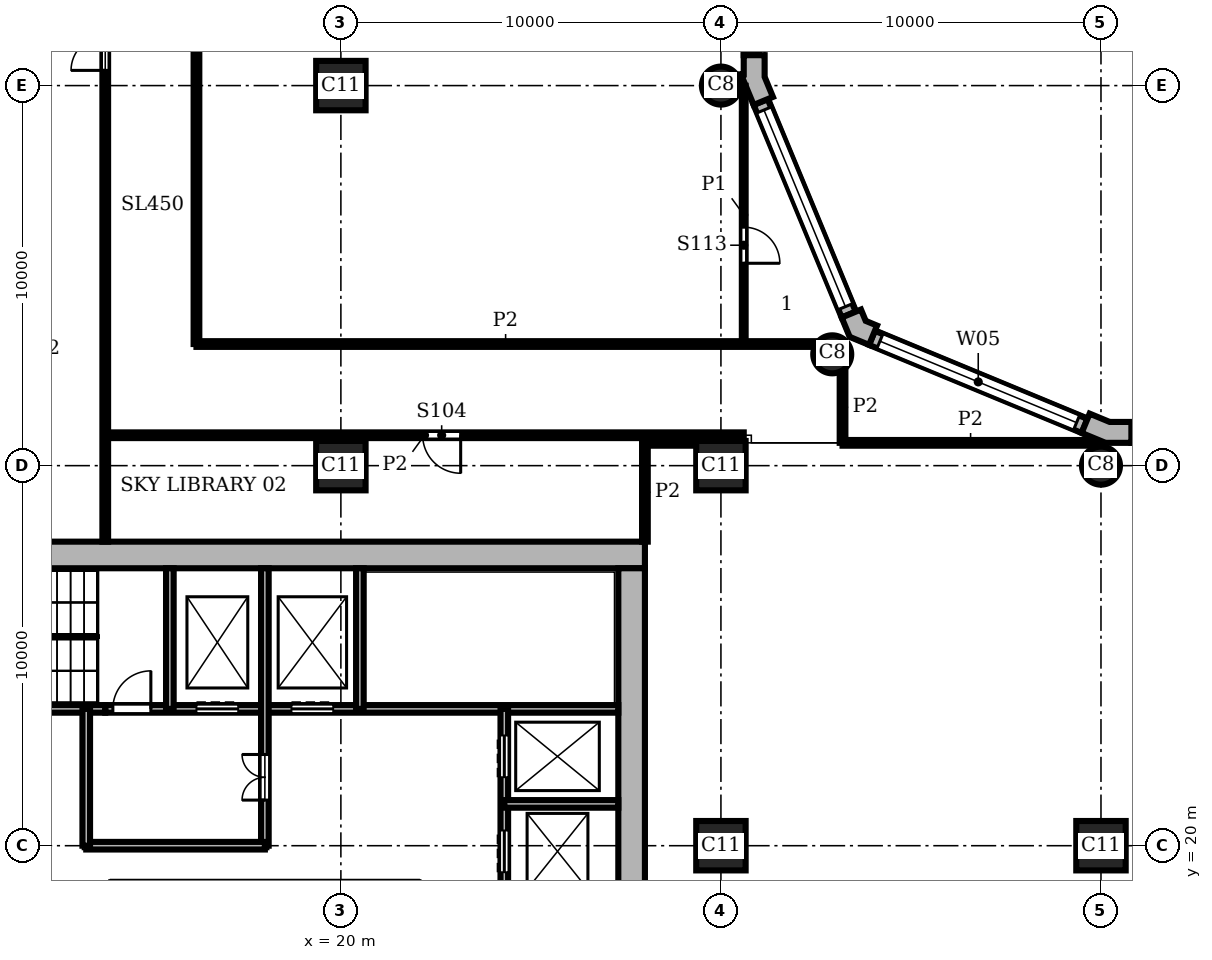
"""IFC4 building model, lengths in metres.
Left out: names, types, materials, properties, quantities, classifications, styles, units other than length and angle.
Written with IfcOpenShell. Run it as: python <this file> out.ifc"""

import sys

from ifc_helpers import new_model, si_unit, direction, frame, frame_2d, origin, origin_2d, place, context, subcontext, project, spatial, polyline, rectangle, circle, outline, extrude, element, fill, save


model = new_model("IFC4")
c1 = context("Model", 3, precision=1e-05, world=origin(), true_north=direction((0.0, 1.0)))
c2 = subcontext(c1, "Body", "Model", "MODEL_VIEW")
j1 = project(units=[si_unit("LENGTHUNIT", "METRE"), si_unit("PLANEANGLEUNIT", "RADIAN")], contexts=[c1])
p1 = place(None, origin())
s1 = spatial("IfcSite", under=j1, at=p1, CompositionType="ELEMENT")
p2 = place(p1, origin())
s2 = spatial("IfcBuilding", under=s1, at=p2, CompositionType="ELEMENT")
p3 = place(p2, frame((0.0, 0.0, 126.3)))
s3 = spatial("IfcBuildingStorey", under=s2, at=p3, CompositionType="ELEMENT", Elevation=126.3)
for number, where, z_axis, x_axis in (
    (1, (40.0, 30.0, 0.0), (0.0, 0.0, 1.0), (1.0, 0.0, 0.0)),
    (2, (32.929, 32.929, 0.0), (0.0, 0.0, 1.0), (1.0, 0.0, 0.0)),
    (3, (30.0, 40.0, 0.0), (0.0, 0.0, 1.0), (1.0, 0.0, 0.0)),
):
    element("IfcColumn", number, at=place(p3, frame(where, z_axis=z_axis, x_axis=x_axis)), inside=s3, PredefinedType="COLUMN", context=c2, shape_type="SweptSolid", body=[
        extrude(circle(Radius=0.5, at=origin_2d()), origin(), (0.0, 0.0, 1.0), 5.4),
    ])
for number, where, z_axis, x_axis in (
    (4, (20.0, 30.0, 0.0), (0.0, 0.0, 1.0), (1.0, 0.0, 0.0)),
    (5, (20.0, 40.0, 0.0), (0.0, 0.0, 1.0), (1.0, 0.0, 0.0)),
    (6, (30.0, 20.0, 0.0), (0.0, 0.0, 1.0), (1.0, 0.0, 0.0)),
    (7, (30.0, 30.0, 0.0), (0.0, 0.0, 1.0), (1.0, 0.0, 0.0)),
    (8, (40.0, 20.0, 0.0), (0.0, 0.0, 1.0), (1.0, 0.0, 0.0)),
):
    element("IfcColumn", number, at=place(p3, frame(where, z_axis=z_axis, x_axis=x_axis)), inside=s3, PredefinedType="COLUMN", context=c2, shape_type="SweptSolid", body=[
        extrude(rectangle(XDim=1.3, YDim=1.3, at=origin_2d()), origin(), (0.0, 0.0, 1.0), 5.4),
    ])
p4 = place(p3, frame((27.65, 8.7, 0.0), z_axis=(0.0, 0.0, 1.0), x_axis=(0.0, 1.0, 0.0)))
e9 = element("IfcWall", 9, at=p4, inside=s3, PredefinedType="SHEAR", context=c2, shape_type="SweptSolid", body=[
    extrude(rectangle(XDim=18.6, YDim=0.7, at=frame_2d((9.3, 0.0))), origin(), (0.0, 0.0, 1.0), 5.4),
])
p5 = place(p4, frame((4.75, 0.0, 0.0)))
e10 = element("IfcOpeningElement", 10, at=p5, cuts=e9, PredefinedType="OPENING", context=c2, shape_type="SweptSolid", body=[
    extrude(rectangle(XDim=1.6, YDim=2.1, at=frame_2d((0.8, 1.05))), frame((0.0, 0.36, 0.0), z_axis=(0.0, -1.0, 0.0), x_axis=(1.0, 0.0, 0.0)), (0.0, 0.0, 1.0), 0.72),
])
p6 = place(p3, frame((28.0, 27.65, 0.0), z_axis=(0.0, 0.0, 1.0), x_axis=(-1.0, 0.0, 0.0)))
e11 = element("IfcWall", 11, at=p6, inside=s3, PredefinedType="SHEAR", context=c2, shape_type="SweptSolid", body=[
    extrude(rectangle(XDim=20.0, YDim=0.7, at=frame_2d((10.0, 0.0))), origin(), (0.0, 0.0, 1.0), 5.4),
])
p7 = place(p3, origin())
e12 = element("IfcWall", 12, at=p7, inside=s3, PredefinedType="SOLIDWALL", context=c2, shape_type="SweptSolid", body=[
    extrude(outline(polyline([(40.8, 31.0), (40.8, 31.15), (40.229, 31.15), (39.701, 31.369), (39.644, 31.23), (39.49, 30.861), (40.119, 30.6), (40.8, 30.6), (40.8, 31.0)])), origin(), (0.0, 0.0, 1.0), 5.4),
])
e13 = element("IfcWall", 13, at=p7, inside=s3, PredefinedType="SOLIDWALL", context=c2, shape_type="SweptSolid", body=[
    extrude(outline(polyline([(34.051, 33.547), (34.108, 33.685), (33.809, 33.809), (33.685, 34.108), (33.547, 34.051), (33.177, 33.898), (33.388, 33.388), (33.898, 33.177), (34.051, 33.547)])), origin(), (0.0, 0.0, 1.0), 5.4),
])
e14 = element("IfcWall", 14, at=p7, inside=s3, PredefinedType="SOLIDWALL", context=c2, shape_type="SweptSolid", body=[
    extrude(outline(polyline([(30.62, 39.995), (30.62, 40.071), (30.861, 39.49), (31.23, 39.644), (31.369, 39.701), (31.15, 40.229), (31.15, 40.8), (31.0, 40.8), (30.6, 40.8), (30.6, 40.295), (30.5, 40.295), (30.5, 39.995), (30.62, 39.995)])), origin(), (0.0, 0.0, 1.0), 5.4),
])
p8 = place(p3, frame((59.2, 30.8, 0.0), z_axis=(0.0, 0.0, 1.0), x_axis=(-1.0, 0.0, 0.0)))
e15 = element("IfcWall", 15, at=p8, inside=s3, PredefinedType="SOLIDWALL", context=c2, shape_type="SweptSolid", body=[
    extrude(rectangle(XDim=18.4, YDim=0.4, at=frame_2d((9.2, 0.0))), origin(), (0.0, 0.0, 1.0), 5.4),
])
p9 = place(p8, frame((0.2, 0.0, 0.9)))
e16 = element("IfcOpeningElement", 16, at=p9, cuts=e15, PredefinedType="OPENING", context=c2, shape_type="SweptSolid", body=[
    extrude(rectangle(XDim=8.0, YDim=3.4, at=frame_2d((4.0, 1.7))), frame((0.0, 0.21, 0.0), z_axis=(0.0, -1.0, 0.0), x_axis=(1.0, 0.0, 0.0)), (0.0, 0.0, 1.0), 0.42),
])
p10 = place(p8, frame((10.2, 0.0, 0.9)))
e17 = element("IfcOpeningElement", 17, at=p10, cuts=e15, PredefinedType="OPENING", context=c2, shape_type="SweptSolid", body=[
    extrude(rectangle(XDim=8.0, YDim=3.4, at=frame_2d((4.0, 1.7))), frame((0.0, 0.21, 0.0), z_axis=(0.0, -1.0, 0.0), x_axis=(1.0, 0.0, 0.0)), (0.0, 0.0, 1.0), 0.42),
])
p11 = place(p3, frame((39.567, 31.045, 0.0), z_axis=(0.0, 0.0, 1.0), x_axis=(-0.923891000409, 0.382655745237, 0.0)))
e18 = element("IfcWall", 18, at=p11, inside=s3, PredefinedType="SOLIDWALL", context=c2, shape_type="SweptSolid", body=[
    extrude(rectangle(XDim=6.053, YDim=0.4, at=frame_2d((3.027, 0.0))), origin(), (0.0, 0.0, 1.0), 5.4),
])
p12 = place(p11, frame((0.227, 0.0, 0.9)))
e19 = element("IfcOpeningElement", 19, at=p12, cuts=e18, PredefinedType="OPENING", context=c2, shape_type="SweptSolid", body=[
    extrude(rectangle(XDim=5.6, YDim=3.4, at=frame_2d((2.8, 1.7))), frame((0.0, 0.21, 0.0), z_axis=(0.0, -1.0, 0.0), x_axis=(1.0, 0.0, 0.0)), (0.0, 0.0, 1.0), 0.42),
])
p13 = place(p3, frame((33.362, 33.974, 0.0), z_axis=(0.0, 0.0, 1.0), x_axis=(-0.382655745237, 0.923891000409, 0.0)))
e20 = element("IfcWall", 20, at=p13, inside=s3, PredefinedType="SOLIDWALL", context=c2, shape_type="SweptSolid", body=[
    extrude(rectangle(XDim=6.053, YDim=0.4, at=frame_2d((3.027, 0.0))), origin(), (0.0, 0.0, 1.0), 5.4),
])
p14 = place(p13, frame((0.227, 0.0, 0.9)))
e21 = element("IfcOpeningElement", 21, at=p14, cuts=e20, PredefinedType="OPENING", context=c2, shape_type="SweptSolid", body=[
    extrude(rectangle(XDim=5.6, YDim=3.4, at=frame_2d((2.8, 1.7))), frame((0.0, 0.21, 0.0), z_axis=(0.0, -1.0, 0.0), x_axis=(1.0, 0.0, 0.0)), (0.0, 0.0, 1.0), 0.42),
])
p15 = place(p3, frame((30.8, 40.8, 0.0), z_axis=(0.0, 0.0, 1.0), x_axis=(0.0, 1.0, 0.0)))
e22 = element("IfcWall", 22, at=p15, inside=s3, PredefinedType="SOLIDWALL", context=c2, shape_type="SweptSolid", body=[
    extrude(rectangle(XDim=18.4, YDim=0.4, at=frame_2d((9.2, 0.0))), origin(), (0.0, 0.0, 1.0), 5.4),
])
p16 = place(p15, frame((0.2, 0.0, 0.9)))
e23 = element("IfcOpeningElement", 23, at=p16, cuts=e22, PredefinedType="OPENING", context=c2, shape_type="SweptSolid", body=[
    extrude(rectangle(XDim=8.0, YDim=3.4, at=frame_2d((4.0, 1.7))), frame((0.0, 0.21, 0.0), z_axis=(0.0, -1.0, 0.0), x_axis=(1.0, 0.0, 0.0)), (0.0, 0.0, 1.0), 0.42),
])
p17 = place(p15, frame((10.2, 0.0, 0.9)))
e24 = element("IfcOpeningElement", 24, at=p17, cuts=e22, PredefinedType="OPENING", context=c2, shape_type="SweptSolid", body=[
    extrude(rectangle(XDim=8.0, YDim=3.4, at=frame_2d((4.0, 1.7))), frame((0.0, 0.21, 0.0), z_axis=(0.0, -1.0, 0.0), x_axis=(1.0, 0.0, 0.0)), (0.0, 0.0, 1.0), 0.42),
])
p18 = place(p3, frame((13.3, 20.0, 0.0), z_axis=(0.0, 0.0, 1.0), x_axis=(1.0, 0.0, 0.0)))
e25 = element("IfcWall", 25, at=p18, inside=s3, PredefinedType="SHEAR", context=c2, shape_type="SweptSolid", body=[
    extrude(rectangle(XDim=4.7, YDim=0.2, at=frame_2d((2.35, 0.0))), origin(), (0.0, 0.0, 1.0), 5.08),
])
p19 = place(p3, frame((24.3, 21.1, 0.0), z_axis=(0.0, 0.0, 1.0), x_axis=(1.0, 0.0, 0.0)))
e26 = element("IfcWall", 26, at=p19, inside=s3, PredefinedType="SHEAR", context=c2, shape_type="SweptSolid", body=[
    extrude(rectangle(XDim=3.0, YDim=0.2, at=frame_2d((1.5, 0.0))), origin(), (0.0, 0.0, 1.0), 5.08),
])
p20 = place(p3, frame((8.7, 23.6, 0.0), z_axis=(0.0, 0.0, 1.0), x_axis=(1.0, 0.0, 0.0)))
e27 = element("IfcWall", 27, at=p20, inside=s3, PredefinedType="SHEAR", context=c2, shape_type="SweptSolid", body=[
    extrude(rectangle(XDim=5.1, YDim=0.2, at=frame_2d((2.55, 0.0))), origin(), (0.0, 0.0, 1.0), 5.08),
])
p21 = place(p3, frame((13.8, 23.6, 0.0), z_axis=(0.0, 0.0, 1.0), x_axis=(1.0, 0.0, 0.0)))
e28 = element("IfcWall", 28, at=p21, inside=s3, PredefinedType="SHEAR", context=c2, shape_type="SweptSolid", body=[
    extrude(rectangle(XDim=13.5, YDim=0.2, at=frame_2d((6.75, 0.0))), origin(), (0.0, 0.0, 1.0), 5.08),
])
p22 = place(p21, frame((2.4, 0.0, 0.0)))
e29 = element("IfcOpeningElement", 29, at=p22, cuts=e28, PredefinedType="OPENING", context=c2, shape_type="SweptSolid", body=[
    extrude(rectangle(XDim=1.1, YDim=2.1, at=frame_2d((0.55, 1.05))), frame((0.0, 0.11, 0.0), z_axis=(0.0, -1.0, 0.0), x_axis=(1.0, 0.0, 0.0)), (0.0, 0.0, 1.0), 0.22),
])
p23 = place(p21, frame((4.9, 0.0, 0.0)))
e30 = element("IfcOpeningElement", 30, at=p23, cuts=e28, PredefinedType="OPENING", context=c2, shape_type="SweptSolid", body=[
    extrude(rectangle(XDim=1.1, YDim=2.1, at=frame_2d((0.55, 1.05))), frame((0.0, 0.11, 0.0), z_axis=(0.0, -1.0, 0.0), x_axis=(1.0, 0.0, 0.0)), (0.0, 0.0, 1.0), 0.22),
])
p24 = place(p21, frame((0.2, 0.0, 0.0)))
e31 = element("IfcOpeningElement", 31, at=p24, cuts=e28, PredefinedType="OPENING", context=c2, shape_type="SweptSolid", body=[
    extrude(rectangle(XDim=1.0, YDim=2.1, at=frame_2d((0.5, 1.05))), frame((0.0, 0.11, 0.0), z_axis=(0.0, -1.0, 0.0), x_axis=(1.0, 0.0, 0.0)), (0.0, 0.0, 1.0), 0.22),
])
p25 = place(p3, frame((13.3, 20.0, 0.0), z_axis=(0.0, 0.0, 1.0), x_axis=(0.0, 1.0, 0.0)))
e32 = element("IfcWall", 32, at=p25, inside=s3, PredefinedType="SHEAR", context=c2, shape_type="SweptSolid", body=[
    extrude(rectangle(XDim=3.6, YDim=0.2, at=frame_2d((1.8, 0.0))), origin(), (0.0, 0.0, 1.0), 5.08),
])
p26 = place(p3, frame((15.5, 23.6, 0.0), z_axis=(0.0, 0.0, 1.0), x_axis=(0.0, 1.0, 0.0)))
e33 = element("IfcWall", 33, at=p26, inside=s3, PredefinedType="SHEAR", context=c2, shape_type="SweptSolid", body=[
    extrude(rectangle(XDim=3.7, YDim=0.2, at=frame_2d((1.85, 0.0))), origin(), (0.0, 0.0, 1.0), 5.08),
])
p27 = place(p3, frame((18.0, 20.0, 0.0), z_axis=(0.0, 0.0, 1.0), x_axis=(0.0, 1.0, 0.0)))
e34 = element("IfcWall", 34, at=p27, inside=s3, PredefinedType="SHEAR", context=c2, shape_type="SweptSolid", body=[
    extrude(rectangle(XDim=7.3, YDim=0.2, at=frame_2d((3.65, 0.0))), origin(), (0.0, 0.0, 1.0), 5.08),
])
p28 = place(p27, frame((1.2, 0.0, 0.0)))
e35 = element("IfcOpeningElement", 35, at=p28, cuts=e34, PredefinedType="OPENING", context=c2, shape_type="SweptSolid", body=[
    extrude(rectangle(XDim=1.2, YDim=2.1, at=frame_2d((0.6, 1.05))), frame((0.0, 0.11, 0.0), z_axis=(0.0, -1.0, 0.0), x_axis=(1.0, 0.0, 0.0)), (0.0, 0.0, 1.0), 0.22),
])
p29 = place(p3, frame((20.5, 23.6, 0.0), z_axis=(0.0, 0.0, 1.0), x_axis=(0.0, 1.0, 0.0)))
e36 = element("IfcWall", 36, at=p29, inside=s3, PredefinedType="SHEAR", context=c2, shape_type="SweptSolid", body=[
    extrude(rectangle(XDim=3.7, YDim=0.2, at=frame_2d((1.85, 0.0))), origin(), (0.0, 0.0, 1.0), 5.08),
])
p30 = place(p3, frame((24.3, 16.1, 0.0), z_axis=(0.0, 0.0, 1.0), x_axis=(0.0, 1.0, 0.0)))
e37 = element("IfcWall", 37, at=p30, inside=s3, PredefinedType="SHEAR", context=c2, shape_type="SweptSolid", body=[
    extrude(rectangle(XDim=7.5, YDim=0.2, at=frame_2d((3.75, 0.0))), origin(), (0.0, 0.0, 1.0), 5.08),
])
p31 = place(p30, frame((0.7, 0.0, 0.0)))
e38 = element("IfcOpeningElement", 38, at=p31, cuts=e37, PredefinedType="OPENING", context=c2, shape_type="SweptSolid", body=[
    extrude(rectangle(XDim=1.1, YDim=2.1, at=frame_2d((0.55, 1.05))), frame((0.0, 0.11, 0.0), z_axis=(0.0, -1.0, 0.0), x_axis=(1.0, 0.0, 0.0)), (0.0, 0.0, 1.0), 0.22),
])
p32 = place(p30, frame((3.2, 0.0, 0.0)))
e39 = element("IfcOpeningElement", 39, at=p32, cuts=e37, PredefinedType="OPENING", context=c2, shape_type="SweptSolid", body=[
    extrude(rectangle(XDim=1.1, YDim=2.1, at=frame_2d((0.55, 1.05))), frame((0.0, 0.11, 0.0), z_axis=(0.0, -1.0, 0.0), x_axis=(1.0, 0.0, 0.0)), (0.0, 0.0, 1.0), 0.22),
])
p33 = place(p30, frame((5.7, 0.0, 0.0)))
e40 = element("IfcOpeningElement", 40, at=p33, cuts=e37, PredefinedType="OPENING", context=c2, shape_type="SweptSolid", body=[
    extrude(rectangle(XDim=1.1, YDim=2.1, at=frame_2d((0.55, 1.05))), frame((0.0, 0.11, 0.0), z_axis=(0.0, -1.0, 0.0), x_axis=(1.0, 0.0, 0.0)), (0.0, 0.0, 1.0), 0.22),
])
p34 = place(p3, frame((30.6, 33.2, 0.0), z_axis=(0.0, 0.0, 1.0), x_axis=(0.0, 1.0, 0.0)))
e41 = element("IfcWall", 41, at=p34, inside=s3, PredefinedType="PARTITIONING", context=c2, shape_type="SweptSolid", body=[
    extrude(rectangle(XDim=6.795, YDim=0.1, at=frame_2d((3.397, 0.0))), origin(), (0.0, 0.0, 1.0), 5.08),
])
p35 = place(p34, frame((2.125, 0.0, 0.0)))
e42 = element("IfcOpeningElement", 42, at=p35, cuts=e41, PredefinedType="OPENING", context=c2, shape_type="SweptSolid", body=[
    extrude(rectangle(XDim=0.95, YDim=2.1, at=frame_2d((0.475, 1.05))), frame((0.0, 0.06, 0.0), z_axis=(0.0, -1.0, 0.0), x_axis=(1.0, 0.0, 0.0)), (0.0, 0.0, 1.0), 0.12),
])
p36 = place(p3, frame((13.8, 28.0, 0.0), z_axis=(0.0, 0.0, 1.0), x_axis=(0.0, 1.0, 0.0)))
e43 = element("IfcWall", 43, at=p36, inside=s3, PredefinedType="PARTITIONING", context=c2, shape_type="SweptSolid", body=[
    extrude(rectangle(XDim=29.6, YDim=0.15, at=frame_2d((14.8, 0.0))), origin(), (0.0, 0.0, 1.0), 5.08),
])
p37 = place(p36, frame((12.4, 0.0, 0.0)))
e44 = element("IfcOpeningElement", 44, at=p37, cuts=e43, PredefinedType="OPENING", context=c2, shape_type="SweptSolid", body=[
    extrude(rectangle(XDim=1.8, YDim=2.1, at=frame_2d((0.9, 1.05))), frame((0.0, 0.085, 0.0), z_axis=(0.0, -1.0, 0.0), x_axis=(1.0, 0.0, 0.0)), (0.0, 0.0, 1.0), 0.17),
])
p38 = place(p3, frame((16.2, 33.2, 0.0), z_axis=(0.0, 0.0, 1.0), x_axis=(0.0, 1.0, 0.0)))
e45 = element("IfcWall", 45, at=p38, inside=s3, PredefinedType="PARTITIONING", context=c2, shape_type="SweptSolid", body=[
    extrude(rectangle(XDim=24.4, YDim=0.15, at=frame_2d((12.2, 0.0))), origin(), (0.0, 0.0, 1.0), 5.08),
])
p39 = place(p38, frame((9.35, 0.0, 0.0)))
e46 = element("IfcOpeningElement", 46, at=p39, cuts=e45, PredefinedType="OPENING", context=c2, shape_type="SweptSolid", body=[
    extrude(rectangle(XDim=1.8, YDim=2.1, at=frame_2d((0.9, 1.05))), frame((0.0, 0.085, 0.0), z_axis=(0.0, -1.0, 0.0), x_axis=(1.0, 0.0, 0.0)), (0.0, 0.0, 1.0), 0.17),
])
p40 = place(p3, frame((28.0, 28.0, 0.0), z_axis=(0.0, 0.0, 1.0), x_axis=(0.0, 1.0, 0.0)))
e47 = element("IfcWall", 47, at=p40, inside=s3, PredefinedType="PARTITIONING", context=c2, shape_type="SweptSolid", body=[
    extrude(rectangle(XDim=2.598, YDim=0.15, at=frame_2d((1.299, 0.0))), origin(), (0.0, 0.0, 1.0), 5.08),
])
p41 = place(p3, frame((33.2, 30.6, 0.0), z_axis=(0.0, 0.0, 1.0), x_axis=(0.0, 1.0, 0.0)))
e48 = element("IfcWall", 48, at=p41, inside=s3, PredefinedType="PARTITIONING", context=c2, shape_type="SweptSolid", body=[
    extrude(rectangle(XDim=1.869, YDim=0.15, at=frame_2d((0.935, 0.0))), origin(), (0.0, 0.0, 1.0), 5.08),
])
p42 = place(p3, frame((28.002, 30.6, 0.0), z_axis=(0.0, 0.0, 1.0), x_axis=(1.0, 0.0, 0.0)))
e49 = element("IfcWall", 49, at=p42, inside=s3, PredefinedType="PARTITIONING", context=c2, shape_type="SweptSolid", body=[
    extrude(rectangle(XDim=1.348, YDim=0.15, at=frame_2d((0.674, 0.0))), origin(), (0.0, 0.0, 1.0), 5.08),
])
p43 = place(p3, frame((33.2, 30.6, 0.0), z_axis=(0.0, 0.0, 1.0), x_axis=(1.0, 0.0, 0.0)))
e50 = element("IfcWall", 50, at=p43, inside=s3, PredefinedType="PARTITIONING", context=c2, shape_type="SweptSolid", body=[
    extrude(rectangle(XDim=6.738, YDim=0.15, at=frame_2d((3.369, 0.0))), origin(), (0.0, 0.0, 1.0), 5.08),
])
p44 = place(p3, frame((13.802, 30.8, 0.0), z_axis=(0.0, 0.0, 1.0), x_axis=(1.0, 0.0, 0.0)))
e51 = element("IfcWall", 51, at=p44, inside=s3, PredefinedType="PARTITIONING", context=c2, shape_type="SweptSolid", body=[
    extrude(rectangle(XDim=16.798, YDim=0.15, at=frame_2d((8.399, 0.0))), origin(), (0.0, 0.0, 1.0), 5.08),
])
p45 = place(p44, frame((8.35, 0.0, 0.0)))
e52 = element("IfcOpeningElement", 52, at=p45, cuts=e51, PredefinedType="OPENING", context=c2, shape_type="SweptSolid", body=[
    extrude(rectangle(XDim=1.0, YDim=2.1, at=frame_2d((0.5, 1.05))), frame((0.0, 0.085, 0.0), z_axis=(0.0, -1.0, 0.0), x_axis=(1.0, 0.0, 0.0)), (0.0, 0.0, 1.0), 0.17),
])
p46 = place(p3, frame((16.2, 33.2, 0.0), z_axis=(0.0, 0.0, 1.0), x_axis=(1.0, 0.0, 0.0)))
e53 = element("IfcWall", 53, at=p46, inside=s3, PredefinedType="PARTITIONING", context=c2, shape_type="SweptSolid", body=[
    extrude(rectangle(XDim=16.269, YDim=0.15, at=frame_2d((8.135, 0.0))), origin(), (0.0, 0.0, 1.0), 5.08),
])
p47 = place(p12, origin())
e54 = element("IfcWindow", 54, at=p47, inside=s3, PartitioningType="SINGLE_PANEL", PredefinedType="WINDOW", context=c2, shape_type="SweptSolid", body=[
    extrude(rectangle(XDim=5.6, YDim=3.4, at=frame_2d((2.8, 1.7))), frame((0.0, 0.16, 0.0), z_axis=(0.0, -1.0, 0.0), x_axis=(1.0, 0.0, 0.0)), (0.0, 0.0, 1.0), 0.06),
])
fill(e19, e54)
p48 = place(p14, origin())
e55 = element("IfcWindow", 55, at=p48, inside=s3, PartitioningType="SINGLE_PANEL", PredefinedType="WINDOW", context=c2, shape_type="SweptSolid", body=[
    extrude(rectangle(XDim=5.6, YDim=3.4, at=frame_2d((2.8, 1.7))), frame((0.0, 0.16, 0.0), z_axis=(0.0, -1.0, 0.0), x_axis=(1.0, 0.0, 0.0)), (0.0, 0.0, 1.0), 0.06),
])
fill(e21, e55)
p49 = place(p32, origin())
e56 = element("IfcDoor", 56, at=p49, inside=s3, OperationType="DOUBLE_DOOR_SLIDING", PredefinedType="DOOR", context=c2, shape_type="SweptSolid", body=[
    extrude(rectangle(XDim=1.1, YDim=2.1, at=frame_2d((0.55, 1.05))), frame((0.0, 0.025, 0.0), z_axis=(0.0, -1.0, 0.0), x_axis=(1.0, 0.0, 0.0)), (0.0, 0.0, 1.0), 0.05),
])
fill(e39, e56)
p50 = place(p33, origin())
e57 = element("IfcDoor", 57, at=p50, inside=s3, OperationType="DOUBLE_DOOR_SLIDING", PredefinedType="DOOR", context=c2, shape_type="SweptSolid", body=[
    extrude(rectangle(XDim=1.1, YDim=2.1, at=frame_2d((0.55, 1.05))), frame((0.0, 0.025, 0.0), z_axis=(0.0, -1.0, 0.0), x_axis=(1.0, 0.0, 0.0)), (0.0, 0.0, 1.0), 0.05),
])
fill(e40, e57)
p51 = place(p22, origin())
e58 = element("IfcDoor", 58, at=p51, inside=s3, OperationType="DOUBLE_DOOR_SLIDING", PredefinedType="DOOR", context=c2, shape_type="SweptSolid", body=[
    extrude(rectangle(XDim=1.1, YDim=2.1, at=frame_2d((0.55, 1.05))), frame((0.0, 0.025, 0.0), z_axis=(0.0, -1.0, 0.0), x_axis=(1.0, 0.0, 0.0)), (0.0, 0.0, 1.0), 0.05),
])
fill(e29, e58)
p52 = place(p23, origin())
e59 = element("IfcDoor", 59, at=p52, inside=s3, OperationType="DOUBLE_DOOR_SLIDING", PredefinedType="DOOR", context=c2, shape_type="SweptSolid", body=[
    extrude(rectangle(XDim=1.1, YDim=2.1, at=frame_2d((0.55, 1.05))), frame((0.0, 0.025, 0.0), z_axis=(0.0, -1.0, 0.0), x_axis=(1.0, 0.0, 0.0)), (0.0, 0.0, 1.0), 0.05),
])
fill(e30, e59)
p53 = place(p24, origin())
e60 = element("IfcDoor", 60, at=p53, inside=s3, OperationType="SINGLE_SWING_RIGHT", PredefinedType="DOOR", context=c2, shape_type="SweptSolid", body=[
    extrude(rectangle(XDim=1.0, YDim=2.1, at=frame_2d((0.5, 1.05))), frame((0.0, 0.025, 0.0), z_axis=(0.0, -1.0, 0.0), x_axis=(1.0, 0.0, 0.0)), (0.0, 0.0, 1.0), 0.05),
])
fill(e31, e60)
p54 = place(p28, origin())
e61 = element("IfcDoor", 61, at=p54, inside=s3, OperationType="DOUBLE_DOOR_SINGLE_SWING", PredefinedType="DOOR", context=c2, shape_type="SweptSolid", body=[
    extrude(rectangle(XDim=1.2, YDim=2.1, at=frame_2d((0.6, 1.05))), frame((0.0, 0.025, 0.0), z_axis=(0.0, -1.0, 0.0), x_axis=(1.0, 0.0, 0.0)), (0.0, 0.0, 1.0), 0.05),
])
fill(e35, e61)
p55 = place(p45, frame((1.0, 0.0, 0.0), z_axis=(0.0, 0.0, 1.0), x_axis=(-1.0, 0.0, 0.0)))
e62 = element("IfcDoor", 62, at=p55, inside=s3, OperationType="SINGLE_SWING_LEFT", PredefinedType="DOOR", context=c2, shape_type="SweptSolid", body=[
    extrude(rectangle(XDim=1.0, YDim=2.1, at=frame_2d((0.5, 1.05))), frame((0.0, 0.025, 0.0), z_axis=(0.0, -1.0, 0.0), x_axis=(1.0, 0.0, 0.0)), (0.0, 0.0, 1.0), 0.05),
])
fill(e52, e62)
p56 = place(p37, origin())
e63 = element("IfcDoor", 63, at=p56, inside=s3, OperationType="DOUBLE_DOOR_SINGLE_SWING", PredefinedType="DOOR", context=c2, shape_type="SweptSolid", body=[
    extrude(rectangle(XDim=1.8, YDim=2.1, at=frame_2d((0.9, 1.05))), frame((0.0, 0.025, 0.0), z_axis=(0.0, -1.0, 0.0), x_axis=(1.0, 0.0, 0.0)), (0.0, 0.0, 1.0), 0.05),
])
fill(e44, e63)
p57 = place(p35, frame((0.95, 0.0, 0.0), z_axis=(0.0, 0.0, 1.0), x_axis=(-1.0, 0.0, 0.0)))
e64 = element("IfcDoor", 64, at=p57, inside=s3, OperationType="SINGLE_SWING_RIGHT", PredefinedType="DOOR", context=c2, shape_type="SweptSolid", body=[
    extrude(rectangle(XDim=0.95, YDim=2.1, at=frame_2d((0.475, 1.05))), frame((0.0, 0.025, 0.0), z_axis=(0.0, -1.0, 0.0), x_axis=(1.0, 0.0, 0.0)), (0.0, 0.0, 1.0), 0.05),
])
fill(e42, e64)
save(model, sys.argv[1])
